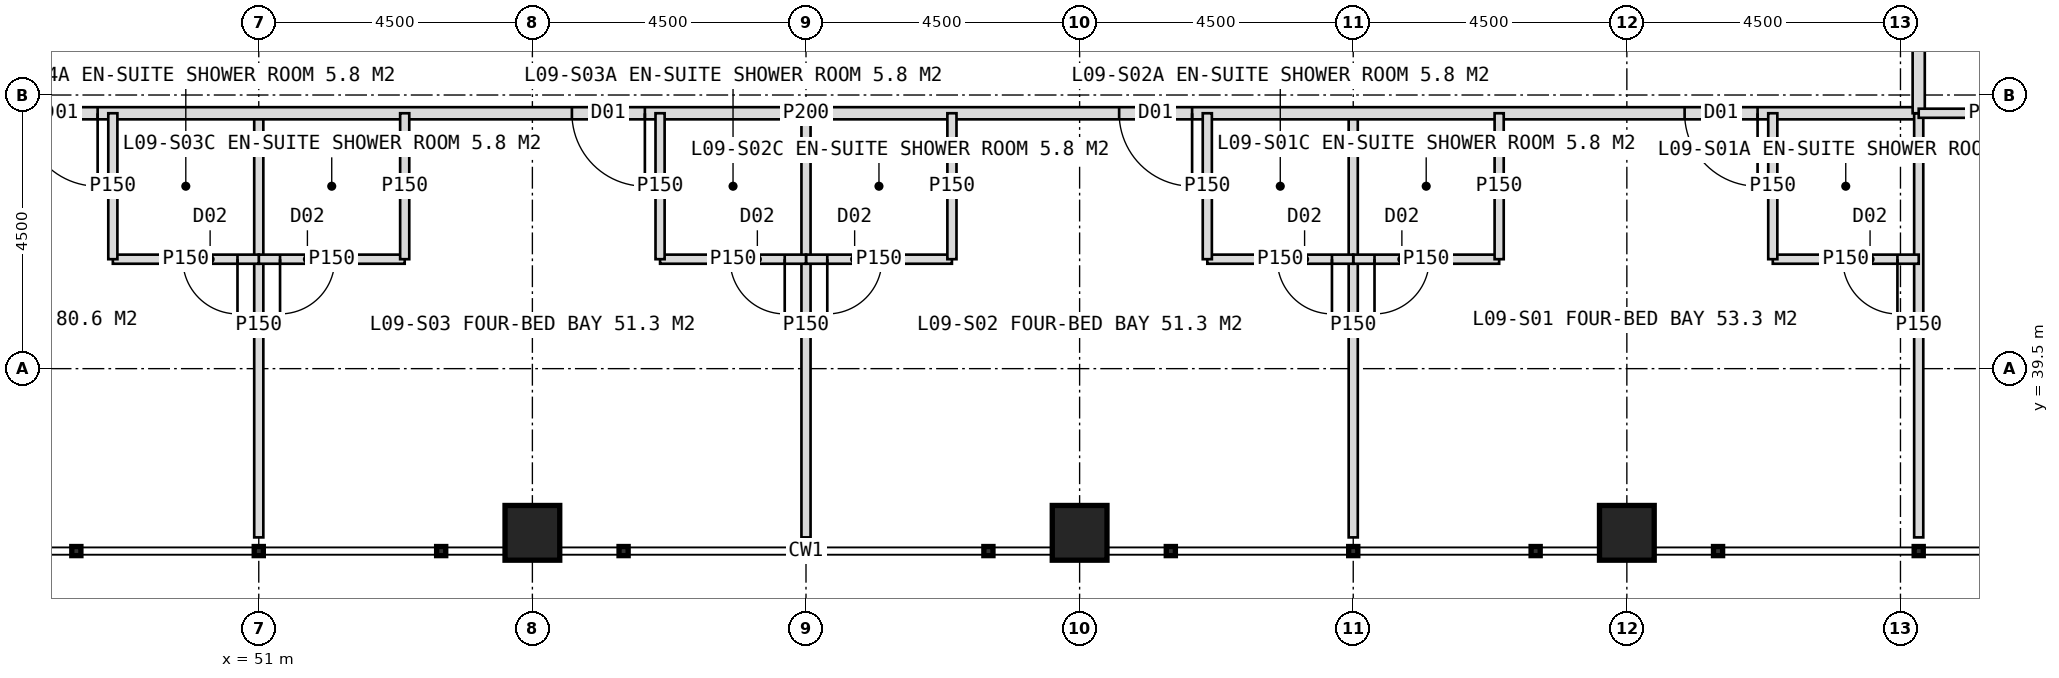
"""IFC4 building model, lengths in metres.
Left out: names, types, materials, properties, quantities, classifications, styles, units other than length and angle.
Written with IfcOpenShell. Run it as: python <this file> out.ifc"""

import sys

from ifc_helpers import new_model, si_unit, direction, frame, frame_2d, origin, origin_2d, place, context, subcontext, project, spatial, rectangle, hollow_rectangle, extrude, element, fill, save


model = new_model("IFC4")
c1 = context("Model", 3, precision=1e-05, world=origin(), true_north=direction((0.0, 1.0)))
c2 = subcontext(c1, "Body", "Model", "MODEL_VIEW")
j1 = project(units=[si_unit("LENGTHUNIT", "METRE"), si_unit("PLANEANGLEUNIT", "RADIAN")], contexts=[c1])
p1 = place(None, origin())
s1 = spatial("IfcSite", under=j1, at=p1, CompositionType="ELEMENT")
p2 = place(p1, origin())
s2 = spatial("IfcBuilding", under=s1, at=p2, CompositionType="ELEMENT")
p3 = place(p2, frame((0.0, 0.0, 43.0)))
s3 = spatial("IfcBuildingStorey", under=s2, at=p3, CompositionType="ELEMENT", Elevation=43.0)
for number, where, z_axis, x_axis in (
    (1, (55.5, 36.8, 0.0), (0.0, 0.0, 1.0), (1.0, 0.0, 0.0)),
    (2, (64.5, 36.8, 0.0), (0.0, 0.0, 1.0), (1.0, 0.0, 0.0)),
    (3, (73.5, 36.8, 0.0), (0.0, 0.0, 1.0), (1.0, 0.0, 0.0)),
):
    element("IfcColumn", number, at=place(p3, frame(where, z_axis=z_axis, x_axis=x_axis)), inside=s3, PredefinedType="COLUMN", context=c2, shape_type="SweptSolid", body=[
        extrude(hollow_rectangle(XDim=0.9, YDim=0.9, WallThickness=0.08, at=origin_2d()), origin(), (0.0, 0.0, 1.0), 4.0),
    ])
p4 = place(p3, frame((69.0, 43.7, 0.0), z_axis=(0.0, 0.0, 1.0), x_axis=(0.0, -1.0, 0.0)))
e4 = element("IfcWall", 4, at=p4, inside=s3, PredefinedType="PARTITIONING", context=c2, shape_type="SweptSolid", body=[
    extrude(rectangle(XDim=6.975, YDim=0.15, at=frame_2d((3.487, 0.0))), origin(), (0.0, 0.0, 1.0), 3.75),
])
p5 = place(p3, frame((60.0, 43.7, 0.0), z_axis=(0.0, 0.0, 1.0), x_axis=(0.0, -1.0, 0.0)))
e5 = element("IfcWall", 5, at=p5, inside=s3, PredefinedType="PARTITIONING", context=c2, shape_type="SweptSolid", body=[
    extrude(rectangle(XDim=6.975, YDim=0.15, at=frame_2d((3.487, 0.0))), origin(), (0.0, 0.0, 1.0), 2.75),
])
p6 = place(p3, frame((51.0, 43.7, 0.0), z_axis=(0.0, 0.0, 1.0), x_axis=(0.0, -1.0, 0.0)))
e6 = element("IfcWall", 6, at=p6, inside=s3, PredefinedType="PARTITIONING", context=c2, shape_type="SweptSolid", body=[
    extrude(rectangle(XDim=6.975, YDim=0.15, at=frame_2d((3.487, 0.0))), origin(), (0.0, 0.0, 1.0), 3.75),
])
p7 = place(p3, frame((78.3, 43.7, 0.0), z_axis=(0.0, 0.0, 1.0), x_axis=(-1.0, 0.0, 0.0)))
e7 = element("IfcWall", 7, at=p7, inside=s3, PredefinedType="PARTITIONING", context=c2, shape_type="SweptSolid", body=[
    extrude(rectangle(XDim=36.6, YDim=0.2, at=frame_2d((18.3, 0.0))), origin(), (0.0, 0.0, 1.0), 3.75),
])
p8 = place(p7, frame((2.65, 0.0, 0.0)))
e8 = element("IfcOpeningElement", 8, at=p8, cuts=e7, PredefinedType="OPENING", context=c2, shape_type="SweptSolid", body=[
    extrude(rectangle(XDim=1.2, YDim=2.2, at=frame_2d((0.6, 1.1))), frame((0.0, 0.11, 0.0), z_axis=(0.0, -1.0, 0.0), x_axis=(1.0, 0.0, 0.0)), (0.0, 0.0, 1.0), 0.22),
])
p9 = place(p7, frame((11.95, 0.0, 0.0)))
e9 = element("IfcOpeningElement", 9, at=p9, cuts=e7, PredefinedType="OPENING", context=c2, shape_type="SweptSolid", body=[
    extrude(rectangle(XDim=1.2, YDim=2.2, at=frame_2d((0.6, 1.1))), frame((0.0, 0.11, 0.0), z_axis=(0.0, -1.0, 0.0), x_axis=(1.0, 0.0, 0.0)), (0.0, 0.0, 1.0), 0.22),
])
p10 = place(p7, frame((20.95, 0.0, 0.0)))
e10 = element("IfcOpeningElement", 10, at=p10, cuts=e7, PredefinedType="OPENING", context=c2, shape_type="SweptSolid", body=[
    extrude(rectangle(XDim=1.2, YDim=2.2, at=frame_2d((0.6, 1.1))), frame((0.0, 0.11, 0.0), z_axis=(0.0, -1.0, 0.0), x_axis=(1.0, 0.0, 0.0)), (0.0, 0.0, 1.0), 0.22),
])
p11 = place(p7, frame((29.95, 0.0, 0.0)))
e11 = element("IfcOpeningElement", 11, at=p11, cuts=e7, PredefinedType="OPENING", context=c2, shape_type="SweptSolid", body=[
    extrude(rectangle(XDim=1.2, YDim=2.2, at=frame_2d((0.6, 1.1))), frame((0.0, 0.11, 0.0), z_axis=(0.0, -1.0, 0.0), x_axis=(1.0, 0.0, 0.0)), (0.0, 0.0, 1.0), 0.22),
])
p12 = place(p3, frame((78.3, 43.7, 0.0), z_axis=(0.0, 0.0, 1.0), x_axis=(0.0, -1.0, 0.0)))
e12 = element("IfcWall", 12, at=p12, inside=s3, PredefinedType="PARTITIONING", context=c2, shape_type="SweptSolid", body=[
    extrude(rectangle(XDim=6.975, YDim=0.15, at=frame_2d((3.487, 0.0))), origin(), (0.0, 0.0, 1.0), 3.75),
])
p13 = place(p3, frame((78.3, 41.3, 0.0), z_axis=(0.0, 0.0, 1.0), x_axis=(-1.0, 0.0, 0.0)))
e13 = element("IfcWall", 13, at=p13, inside=s3, PredefinedType="PARTITIONING", context=c2, shape_type="SweptSolid", body=[
    extrude(rectangle(XDim=2.4, YDim=0.15, at=frame_2d((1.2, 0.0))), origin(), (0.0, 0.0, 1.0), 2.95),
])
p14 = place(p13, frame((0.35, 0.0, 0.0)))
e14 = element("IfcOpeningElement", 14, at=p14, cuts=e13, PredefinedType="OPENING", context=c2, shape_type="SweptSolid", body=[
    extrude(rectangle(XDim=0.9, YDim=2.1, at=frame_2d((0.45, 1.05))), frame((0.0, 0.085, 0.0), z_axis=(0.0, -1.0, 0.0), x_axis=(1.0, 0.0, 0.0)), (0.0, 0.0, 1.0), 0.17),
])
p15 = place(p3, frame((75.9, 43.7, 0.0), z_axis=(0.0, 0.0, 1.0), x_axis=(0.0, -1.0, 0.0)))
e15 = element("IfcWall", 15, at=p15, inside=s3, PredefinedType="PARTITIONING", context=c2, shape_type="SweptSolid", body=[
    extrude(rectangle(XDim=2.4, YDim=0.15, at=frame_2d((1.2, 0.0))), origin(), (0.0, 0.0, 1.0), 3.75),
])
p16 = place(p3, frame((71.4, 41.3, 0.0), z_axis=(0.0, 0.0, 1.0), x_axis=(-1.0, 0.0, 0.0)))
e16 = element("IfcWall", 16, at=p16, inside=s3, PredefinedType="PARTITIONING", context=c2, shape_type="SweptSolid", body=[
    extrude(rectangle(XDim=2.4, YDim=0.15, at=frame_2d((1.2, 0.0))), origin(), (0.0, 0.0, 1.0), 3.75),
])
p17 = place(p16, frame((1.15, 0.0, 0.0)))
e17 = element("IfcOpeningElement", 17, at=p17, cuts=e16, PredefinedType="OPENING", context=c2, shape_type="SweptSolid", body=[
    extrude(rectangle(XDim=0.9, YDim=2.1, at=frame_2d((0.45, 1.05))), frame((0.0, 0.085, 0.0), z_axis=(0.0, -1.0, 0.0), x_axis=(1.0, 0.0, 0.0)), (0.0, 0.0, 1.0), 0.17),
])
p18 = place(p3, frame((71.4, 43.7, 0.0), z_axis=(0.0, 0.0, 1.0), x_axis=(0.0, -1.0, 0.0)))
e18 = element("IfcWall", 18, at=p18, inside=s3, PredefinedType="PARTITIONING", context=c2, shape_type="SweptSolid", body=[
    extrude(rectangle(XDim=2.4, YDim=0.15, at=frame_2d((1.2, 0.0))), origin(), (0.0, 0.0, 1.0), 3.75),
])
p19 = place(p3, frame((69.0, 41.3, 0.0), z_axis=(0.0, 0.0, 1.0), x_axis=(-1.0, 0.0, 0.0)))
e19 = element("IfcWall", 19, at=p19, inside=s3, PredefinedType="PARTITIONING", context=c2, shape_type="SweptSolid", body=[
    extrude(rectangle(XDim=2.4, YDim=0.15, at=frame_2d((1.2, 0.0))), origin(), (0.0, 0.0, 1.0), 3.75),
])
p20 = place(p19, frame((0.35, 0.0, 0.0)))
e20 = element("IfcOpeningElement", 20, at=p20, cuts=e19, PredefinedType="OPENING", context=c2, shape_type="SweptSolid", body=[
    extrude(rectangle(XDim=0.9, YDim=2.1, at=frame_2d((0.45, 1.05))), frame((0.0, 0.085, 0.0), z_axis=(0.0, -1.0, 0.0), x_axis=(1.0, 0.0, 0.0)), (0.0, 0.0, 1.0), 0.17),
])
p21 = place(p3, frame((66.6, 43.7, 0.0), z_axis=(0.0, 0.0, 1.0), x_axis=(0.0, -1.0, 0.0)))
e21 = element("IfcWall", 21, at=p21, inside=s3, PredefinedType="PARTITIONING", context=c2, shape_type="SweptSolid", body=[
    extrude(rectangle(XDim=2.4, YDim=0.15, at=frame_2d((1.2, 0.0))), origin(), (0.0, 0.0, 1.0), 3.75),
])
p22 = place(p3, frame((62.4, 41.3, 0.0), z_axis=(0.0, 0.0, 1.0), x_axis=(-1.0, 0.0, 0.0)))
e22 = element("IfcWall", 22, at=p22, inside=s3, PredefinedType="PARTITIONING", context=c2, shape_type="SweptSolid", body=[
    extrude(rectangle(XDim=2.4, YDim=0.15, at=frame_2d((1.2, 0.0))), origin(), (0.0, 0.0, 1.0), 3.75),
])
p23 = place(p22, frame((1.15, 0.0, 0.0)))
e23 = element("IfcOpeningElement", 23, at=p23, cuts=e22, PredefinedType="OPENING", context=c2, shape_type="SweptSolid", body=[
    extrude(rectangle(XDim=0.9, YDim=2.1, at=frame_2d((0.45, 1.05))), frame((0.0, 0.085, 0.0), z_axis=(0.0, -1.0, 0.0), x_axis=(1.0, 0.0, 0.0)), (0.0, 0.0, 1.0), 0.17),
])
p24 = place(p3, frame((62.4, 43.7, 0.0), z_axis=(0.0, 0.0, 1.0), x_axis=(0.0, -1.0, 0.0)))
e24 = element("IfcWall", 24, at=p24, inside=s3, PredefinedType="PARTITIONING", context=c2, shape_type="SweptSolid", body=[
    extrude(rectangle(XDim=2.4, YDim=0.15, at=frame_2d((1.2, 0.0))), origin(), (0.0, 0.0, 1.0), 3.75),
])
p25 = place(p3, frame((60.0, 41.3, 0.0), z_axis=(0.0, 0.0, 1.0), x_axis=(-1.0, 0.0, 0.0)))
e25 = element("IfcWall", 25, at=p25, inside=s3, PredefinedType="PARTITIONING", context=c2, shape_type="SweptSolid", body=[
    extrude(rectangle(XDim=2.4, YDim=0.15, at=frame_2d((1.2, 0.0))), origin(), (0.0, 0.0, 1.0), 3.75),
])
p26 = place(p25, frame((0.35, 0.0, 0.0)))
e26 = element("IfcOpeningElement", 26, at=p26, cuts=e25, PredefinedType="OPENING", context=c2, shape_type="SweptSolid", body=[
    extrude(rectangle(XDim=0.9, YDim=2.1, at=frame_2d((0.45, 1.05))), frame((0.0, 0.085, 0.0), z_axis=(0.0, -1.0, 0.0), x_axis=(1.0, 0.0, 0.0)), (0.0, 0.0, 1.0), 0.17),
])
p27 = place(p3, frame((57.6, 43.7, 0.0), z_axis=(0.0, 0.0, 1.0), x_axis=(0.0, -1.0, 0.0)))
e27 = element("IfcWall", 27, at=p27, inside=s3, PredefinedType="PARTITIONING", context=c2, shape_type="SweptSolid", body=[
    extrude(rectangle(XDim=2.4, YDim=0.15, at=frame_2d((1.2, 0.0))), origin(), (0.0, 0.0, 1.0), 3.75),
])
p28 = place(p3, frame((53.4, 41.3, 0.0), z_axis=(0.0, 0.0, 1.0), x_axis=(-1.0, 0.0, 0.0)))
e28 = element("IfcWall", 28, at=p28, inside=s3, PredefinedType="PARTITIONING", context=c2, shape_type="SweptSolid", body=[
    extrude(rectangle(XDim=2.4, YDim=0.15, at=frame_2d((1.2, 0.0))), origin(), (0.0, 0.0, 1.0), 3.75),
])
p29 = place(p28, frame((1.15, 0.0, 0.0)))
e29 = element("IfcOpeningElement", 29, at=p29, cuts=e28, PredefinedType="OPENING", context=c2, shape_type="SweptSolid", body=[
    extrude(rectangle(XDim=0.9, YDim=2.1, at=frame_2d((0.45, 1.05))), frame((0.0, 0.085, 0.0), z_axis=(0.0, -1.0, 0.0), x_axis=(1.0, 0.0, 0.0)), (0.0, 0.0, 1.0), 0.17),
])
p30 = place(p3, frame((53.4, 43.7, 0.0), z_axis=(0.0, 0.0, 1.0), x_axis=(0.0, -1.0, 0.0)))
e30 = element("IfcWall", 30, at=p30, inside=s3, PredefinedType="PARTITIONING", context=c2, shape_type="SweptSolid", body=[
    extrude(rectangle(XDim=2.4, YDim=0.15, at=frame_2d((1.2, 0.0))), origin(), (0.0, 0.0, 1.0), 3.75),
])
p31 = place(p3, frame((51.0, 41.3, 0.0), z_axis=(0.0, 0.0, 1.0), x_axis=(-1.0, 0.0, 0.0)))
e31 = element("IfcWall", 31, at=p31, inside=s3, PredefinedType="PARTITIONING", context=c2, shape_type="SweptSolid", body=[
    extrude(rectangle(XDim=2.4, YDim=0.15, at=frame_2d((1.2, 0.0))), origin(), (0.0, 0.0, 1.0), 3.75),
])
p32 = place(p31, frame((0.35, 0.0, 0.0)))
e32 = element("IfcOpeningElement", 32, at=p32, cuts=e31, PredefinedType="OPENING", context=c2, shape_type="SweptSolid", body=[
    extrude(rectangle(XDim=0.9, YDim=2.1, at=frame_2d((0.45, 1.05))), frame((0.0, 0.085, 0.0), z_axis=(0.0, -1.0, 0.0), x_axis=(1.0, 0.0, 0.0)), (0.0, 0.0, 1.0), 0.17),
])
p33 = place(p3, frame((48.6, 43.7, 0.0), z_axis=(0.0, 0.0, 1.0), x_axis=(0.0, -1.0, 0.0)))
e33 = element("IfcWall", 33, at=p33, inside=s3, PredefinedType="PARTITIONING", context=c2, shape_type="SweptSolid", body=[
    extrude(rectangle(XDim=2.4, YDim=0.15, at=frame_2d((1.2, 0.0))), origin(), (0.0, 0.0, 1.0), 3.75),
])
p34 = place(p3, frame((78.3, 80.3, 0.0), z_axis=(0.0, 0.0, 1.0), x_axis=(0.0, -1.0, 0.0)))
e34 = element("IfcWall", 34, at=p34, inside=s3, PredefinedType="PARTITIONING", context=c2, shape_type="SweptSolid", body=[
    extrude(rectangle(XDim=36.6, YDim=0.2, at=frame_2d((18.3, 0.0))), origin(), (0.0, 0.0, 1.0), 3.75),
])
p35 = place(p34, frame((2.65, 0.0, 0.0)))
e35 = element("IfcOpeningElement", 35, at=p35, cuts=e34, PredefinedType="OPENING", context=c2, shape_type="SweptSolid", body=[
    extrude(rectangle(XDim=1.2, YDim=2.2, at=frame_2d((0.6, 1.1))), frame((0.0, 0.11, 0.0), z_axis=(0.0, -1.0, 0.0), x_axis=(1.0, 0.0, 0.0)), (0.0, 0.0, 1.0), 0.22),
])
p36 = place(p34, frame((11.95, 0.0, 0.0)))
e36 = element("IfcOpeningElement", 36, at=p36, cuts=e34, PredefinedType="OPENING", context=c2, shape_type="SweptSolid", body=[
    extrude(rectangle(XDim=1.2, YDim=2.2, at=frame_2d((0.6, 1.1))), frame((0.0, 0.11, 0.0), z_axis=(0.0, -1.0, 0.0), x_axis=(1.0, 0.0, 0.0)), (0.0, 0.0, 1.0), 0.22),
])
p37 = place(p34, frame((20.95, 0.0, 0.0)))
e37 = element("IfcOpeningElement", 37, at=p37, cuts=e34, PredefinedType="OPENING", context=c2, shape_type="SweptSolid", body=[
    extrude(rectangle(XDim=1.2, YDim=2.2, at=frame_2d((0.6, 1.1))), frame((0.0, 0.11, 0.0), z_axis=(0.0, -1.0, 0.0), x_axis=(1.0, 0.0, 0.0)), (0.0, 0.0, 1.0), 0.22),
])
p38 = place(p34, frame((29.95, 0.0, 0.0)))
e38 = element("IfcOpeningElement", 38, at=p38, cuts=e34, PredefinedType="OPENING", context=c2, shape_type="SweptSolid", body=[
    extrude(rectangle(XDim=1.2, YDim=2.2, at=frame_2d((0.6, 1.1))), frame((0.0, 0.11, 0.0), z_axis=(0.0, -1.0, 0.0), x_axis=(1.0, 0.0, 0.0)), (0.0, 0.0, 1.0), 0.22),
])
p39 = place(p3, frame((78.3, 43.7, 0.0), z_axis=(0.0, 0.0, 1.0), x_axis=(1.0, 0.0, 0.0)))
e39 = element("IfcWall", 39, at=p39, inside=s3, PredefinedType="PARTITIONING", context=c2, shape_type="SweptSolid", body=[
    extrude(rectangle(XDim=2.4, YDim=0.15, at=frame_2d((1.2, 0.0))), origin(), (0.0, 0.0, 1.0), 3.75),
])
p40 = place(p8, origin())
e40 = element("IfcDoor", 40, at=p40, inside=s3, OperationType="SINGLE_SWING_LEFT", PredefinedType="DOOR", context=c2, shape_type="SweptSolid", body=[
    extrude(rectangle(XDim=1.2, YDim=2.2, at=frame_2d((0.6, 1.1))), frame((0.0, 0.025, 0.0), z_axis=(0.0, -1.0, 0.0), x_axis=(1.0, 0.0, 0.0)), (0.0, 0.0, 1.0), 0.05),
])
fill(e8, e40)
p41 = place(p14, origin())
e41 = element("IfcDoor", 41, at=p41, inside=s3, OperationType="SINGLE_SWING_LEFT", PredefinedType="DOOR", context=c2, shape_type="SweptSolid", body=[
    extrude(rectangle(XDim=0.9, YDim=2.1, at=frame_2d((0.45, 1.05))), frame((0.0, 0.025, 0.0), z_axis=(0.0, -1.0, 0.0), x_axis=(1.0, 0.0, 0.0)), (0.0, 0.0, 1.0), 0.05),
])
fill(e14, e41)
p42 = place(p17, origin())
e42 = element("IfcDoor", 42, at=p42, inside=s3, OperationType="SINGLE_SWING_RIGHT", PredefinedType="DOOR", context=c2, shape_type="SweptSolid", body=[
    extrude(rectangle(XDim=0.9, YDim=2.1, at=frame_2d((0.45, 1.05))), frame((0.0, 0.025, 0.0), z_axis=(0.0, -1.0, 0.0), x_axis=(1.0, 0.0, 0.0)), (0.0, 0.0, 1.0), 0.05),
])
fill(e17, e42)
p43 = place(p9, origin())
e43 = element("IfcDoor", 43, at=p43, inside=s3, OperationType="SINGLE_SWING_LEFT", PredefinedType="DOOR", context=c2, shape_type="SweptSolid", body=[
    extrude(rectangle(XDim=1.2, YDim=2.2, at=frame_2d((0.6, 1.1))), frame((0.0, 0.025, 0.0), z_axis=(0.0, -1.0, 0.0), x_axis=(1.0, 0.0, 0.0)), (0.0, 0.0, 1.0), 0.05),
])
fill(e9, e43)
p44 = place(p20, origin())
e44 = element("IfcDoor", 44, at=p44, inside=s3, OperationType="SINGLE_SWING_LEFT", PredefinedType="DOOR", context=c2, shape_type="SweptSolid", body=[
    extrude(rectangle(XDim=0.9, YDim=2.1, at=frame_2d((0.45, 1.05))), frame((0.0, 0.025, 0.0), z_axis=(0.0, -1.0, 0.0), x_axis=(1.0, 0.0, 0.0)), (0.0, 0.0, 1.0), 0.05),
])
fill(e20, e44)
p45 = place(p23, origin())
e45 = element("IfcDoor", 45, at=p45, inside=s3, OperationType="SINGLE_SWING_RIGHT", PredefinedType="DOOR", context=c2, shape_type="SweptSolid", body=[
    extrude(rectangle(XDim=0.9, YDim=2.1, at=frame_2d((0.45, 1.05))), frame((0.0, 0.025, 0.0), z_axis=(0.0, -1.0, 0.0), x_axis=(1.0, 0.0, 0.0)), (0.0, 0.0, 1.0), 0.05),
])
fill(e23, e45)
p46 = place(p10, origin())
e46 = element("IfcDoor", 46, at=p46, inside=s3, OperationType="SINGLE_SWING_LEFT", PredefinedType="DOOR", context=c2, shape_type="SweptSolid", body=[
    extrude(rectangle(XDim=1.2, YDim=2.2, at=frame_2d((0.6, 1.1))), frame((0.0, 0.025, 0.0), z_axis=(0.0, -1.0, 0.0), x_axis=(1.0, 0.0, 0.0)), (0.0, 0.0, 1.0), 0.05),
])
fill(e10, e46)
p47 = place(p26, origin())
e47 = element("IfcDoor", 47, at=p47, inside=s3, OperationType="SINGLE_SWING_LEFT", PredefinedType="DOOR", context=c2, shape_type="SweptSolid", body=[
    extrude(rectangle(XDim=0.9, YDim=2.1, at=frame_2d((0.45, 1.05))), frame((0.0, 0.025, 0.0), z_axis=(0.0, -1.0, 0.0), x_axis=(1.0, 0.0, 0.0)), (0.0, 0.0, 1.0), 0.05),
])
fill(e26, e47)
p48 = place(p29, origin())
e48 = element("IfcDoor", 48, at=p48, inside=s3, OperationType="SINGLE_SWING_RIGHT", PredefinedType="DOOR", context=c2, shape_type="SweptSolid", body=[
    extrude(rectangle(XDim=0.9, YDim=2.1, at=frame_2d((0.45, 1.05))), frame((0.0, 0.025, 0.0), z_axis=(0.0, -1.0, 0.0), x_axis=(1.0, 0.0, 0.0)), (0.0, 0.0, 1.0), 0.05),
])
fill(e29, e48)
p49 = place(p11, origin())
e49 = element("IfcDoor", 49, at=p49, inside=s3, OperationType="SINGLE_SWING_LEFT", PredefinedType="DOOR", context=c2, shape_type="SweptSolid", body=[
    extrude(rectangle(XDim=1.2, YDim=2.2, at=frame_2d((0.6, 1.1))), frame((0.0, 0.025, 0.0), z_axis=(0.0, -1.0, 0.0), x_axis=(1.0, 0.0, 0.0)), (0.0, 0.0, 1.0), 0.05),
])
fill(e11, e49)
p50 = place(p32, origin())
e50 = element("IfcDoor", 50, at=p50, inside=s3, OperationType="SINGLE_SWING_LEFT", PredefinedType="DOOR", context=c2, shape_type="SweptSolid", body=[
    extrude(rectangle(XDim=0.9, YDim=2.1, at=frame_2d((0.45, 1.05))), frame((0.0, 0.025, 0.0), z_axis=(0.0, -1.0, 0.0), x_axis=(1.0, 0.0, 0.0)), (0.0, 0.0, 1.0), 0.05),
])
fill(e32, e50)
save(model, sys.argv[1])
